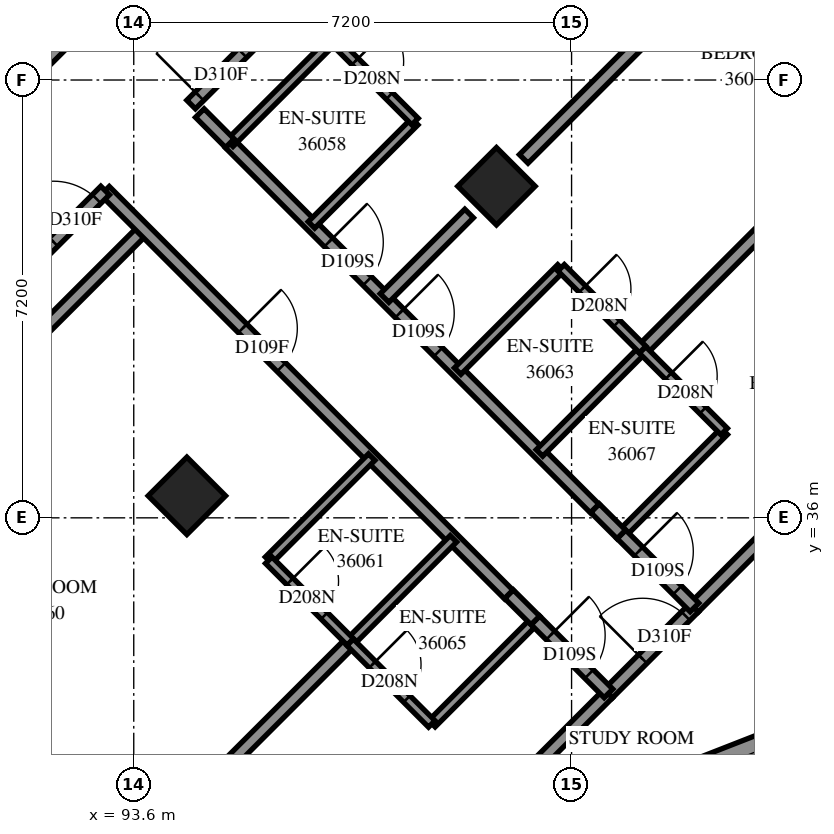
"""IFC4 building model, lengths in metres.
Left out: names, types, materials, properties, quantities, classifications, styles, units other than length and angle.
Written with IfcOpenShell. Run it as: python <this file> out.ifc"""

import sys

from ifc_helpers import new_model, si_unit, direction, frame, frame_2d, origin, origin_2d, place, context, subcontext, project, spatial, polyline, rectangle, outline, extrude, element, fill, save


model = new_model("IFC4")
c1 = context("Model", 3, precision=1e-05, world=origin(), true_north=direction((0.0, 1.0)))
c2 = subcontext(c1, "Body", "Model", "MODEL_VIEW")
j1 = project(units=[si_unit("LENGTHUNIT", "METRE"), si_unit("PLANEANGLEUNIT", "RADIAN")], contexts=[c1])
p1 = place(None, origin())
s1 = spatial("IfcSite", under=j1, at=p1, CompositionType="ELEMENT")
p2 = place(p1, origin())
s2 = spatial("IfcBuilding", under=s1, at=p2, CompositionType="ELEMENT")
p3 = place(p2, frame((0.0, 0.0, 135.4)))
s3 = spatial("IfcBuildingStorey", under=s2, at=p3, CompositionType="ELEMENT", Elevation=135.4)
for number, where, z_axis, x_axis in (
    (1, (99.565, 41.453, 0.0), (0.0, 0.0, 1.0), (0.707, -0.707, 0.0)),
    (2, (94.474, 36.362, 0.0), (0.0, 0.0, 1.0), (0.707, -0.707, 0.0)),
):
    element("IfcColumn", number, at=place(p3, frame(where, z_axis=z_axis, x_axis=x_axis)), inside=s3, PredefinedType="COLUMN", context=c2, shape_type="SweptSolid", body=[
        extrude(rectangle(XDim=0.9, YDim=0.9, at=origin_2d()), origin(), (0.0, 0.0, 1.0), 3.1),
    ])
p4 = place(p3, frame((87.049, 38.695, -0.3), z_axis=(0.0, 0.0, 1.0), x_axis=(0.7071067812, 0.7071067812, 0.0)))
e3 = element("IfcWall", 3, at=p4, inside=s3, PredefinedType="SHEAR", context=c2, shape_type="SweptSolid", body=[
    extrude(rectangle(XDim=14.4, YDim=0.6, at=frame_2d((7.2, 0.0))), origin(), (0.0, 0.0, 1.0), 2.7),
])
p5 = place(p4, frame((4.55, 0.0, 0.3)))
e4 = element("IfcOpeningElement", 4, at=p5, cuts=e3, PredefinedType="OPENING", context=c2, shape_type="SweptSolid", body=[
    extrude(rectangle(XDim=1.1, YDim=2.1, at=frame_2d((0.55, 1.05))), frame((0.0, 0.31, 0.0), z_axis=(0.0, -1.0, 0.0), x_axis=(1.0, 0.0, 0.0)), (0.0, 0.0, 1.0), 0.62),
])
p6 = place(p4, frame((11.35, 0.0, 0.3)))
e5 = element("IfcOpeningElement", 5, at=p6, cuts=e3, PredefinedType="OPENING", context=c2, shape_type="SweptSolid", body=[
    extrude(rectangle(XDim=1.1, YDim=2.1, at=frame_2d((0.55, 1.05))), frame((0.0, 0.31, 0.0), z_axis=(0.0, -1.0, 0.0), x_axis=(1.0, 0.0, 0.0)), (0.0, 0.0, 1.0), 0.62),
])
p7 = place(p3, frame((100.892, 31.004, 0.0), z_axis=(0.0, 0.0, 1.0), x_axis=(0.9313377775, 0.364156483, 0.0)))
e6 = element("IfcWall", 6, at=p7, inside=s3, PredefinedType="SOLIDWALL", context=c2, shape_type="SweptSolid", body=[
    extrude(outline(polyline([(0.11, -0.25), (5.595, -0.25), (5.366, 0.25), (-0.11, 0.25), (0.11, -0.25)])), origin(), (0.0, 0.0, 1.0), 3.1),
])
p8 = place(p7, frame((0.583, 0.0, 0.45)))
e7 = element("IfcOpeningElement", 7, at=p8, cuts=e6, PredefinedType="OPENING", context=c2, shape_type="SweptSolid", body=[
    extrude(rectangle(XDim=2.8, YDim=2.5, at=frame_2d((1.4, 1.25))), frame((0.0, 0.26, 0.0), z_axis=(0.0, -1.0, 0.0), x_axis=(1.0, 0.0, 0.0)), (0.0, 0.0, 1.0), 0.52),
])
p9 = place(p3, frame((86.332, 33.313, 0.0), z_axis=(0.0, 0.0, 1.0), x_axis=(0.7071020252, 0.7071115371, 0.0)))
e8 = element("IfcWall", 8, at=p9, inside=s3, PredefinedType="PARTITIONING", context=c2, shape_type="SweptSolid", body=[
    extrude(rectangle(XDim=10.513, YDim=0.2, at=frame_2d((5.257, 0.0))), origin(), (0.0, 0.0, 1.0), 3.1),
])
p10 = place(p3, frame((93.127, 41.379, 0.0), z_axis=(0.0, 0.0, 1.0), x_axis=(0.7071067812, -0.7071067812, 0.0)))
e9 = element("IfcWall", 9, at=p10, inside=s3, PredefinedType="PARTITIONING", context=c2, shape_type="SweptSolid", body=[
    extrude(rectangle(XDim=9.39, YDim=0.2, at=frame_2d((4.695, 0.0))), origin(), (0.0, 0.0, 1.0), 3.1),
])
p11 = place(p10, frame((3.2, 0.0, 0.0)))
e10 = element("IfcOpeningElement", 10, at=p11, cuts=e9, PredefinedType="OPENING", context=c2, shape_type="SweptSolid", body=[
    extrude(rectangle(XDim=0.9, YDim=2.1, at=frame_2d((0.45, 1.05))), frame((0.0, 0.11, 0.0), z_axis=(0.0, -1.0, 0.0), x_axis=(1.0, 0.0, 0.0)), (0.0, 0.0, 1.0), 0.22),
])
p12 = place(p3, frame((94.543, 42.797, 0.0), z_axis=(0.0, 0.0, 1.0), x_axis=(0.7071067812, 0.7071067812, 0.0)))
e11 = element("IfcWall", 11, at=p12, inside=s3, PredefinedType="PARTITIONING", context=c2, shape_type="SweptSolid", body=[
    extrude(rectangle(XDim=8.901, YDim=0.2, at=frame_2d((4.45, 0.0))), origin(), (0.0, 0.0, 1.0), 3.1),
])
p13 = place(p12, frame((0.193, 0.0, 0.0)))
e12 = element("IfcOpeningElement", 12, at=p13, cuts=e11, PredefinedType="OPENING", context=c2, shape_type="SweptSolid", body=[
    extrude(rectangle(XDim=1.0, YDim=2.1, at=frame_2d((0.5, 1.05))), frame((0.0, 0.11, 0.0), z_axis=(0.0, -1.0, 0.0), x_axis=(1.0, 0.0, 0.0)), (0.0, 0.0, 1.0), 0.22),
])
p14 = place(p3, frame((86.837, 35.091, 0.0), z_axis=(0.0, 0.0, 1.0), x_axis=(0.7071067812, 0.7071067812, 0.0)))
e13 = element("IfcWall", 13, at=p14, inside=s3, PredefinedType="PARTITIONING", context=c2, shape_type="SweptSolid", body=[
    extrude(rectangle(XDim=8.898, YDim=0.2, at=frame_2d((4.449, 0.0))), origin(), (0.0, 0.0, 1.0), 3.1),
])
p15 = place(p14, frame((7.7, 0.0, 0.0)))
e14 = element("IfcOpeningElement", 14, at=p15, cuts=e13, PredefinedType="OPENING", context=c2, shape_type="SweptSolid", body=[
    extrude(rectangle(XDim=1.0, YDim=2.1, at=frame_2d((0.5, 1.05))), frame((0.0, 0.11, 0.0), z_axis=(0.0, -1.0, 0.0), x_axis=(1.0, 0.0, 0.0)), (0.0, 0.0, 1.0), 0.22),
])
p16 = place(p3, frame((95.177, 42.157, 0.0), z_axis=(0.0, 0.0, 1.0), x_axis=(0.7071067812, -0.7071067812, 0.0)))
e15 = element("IfcWall", 15, at=p16, inside=s3, PredefinedType="PARTITIONING", context=c2, shape_type="SweptSolid", body=[
    extrude(rectangle(XDim=8.491, YDim=0.2, at=frame_2d((4.245, 0.0))), origin(), (0.0, 0.0, 1.0), 3.1),
])
p17 = place(p16, frame((2.3, 0.0, 0.0)))
e16 = element("IfcOpeningElement", 16, at=p17, cuts=e15, PredefinedType="OPENING", context=c2, shape_type="SweptSolid", body=[
    extrude(rectangle(XDim=0.9, YDim=2.1, at=frame_2d((0.45, 1.05))), frame((0.0, 0.11, 0.0), z_axis=(0.0, -1.0, 0.0), x_axis=(1.0, 0.0, 0.0)), (0.0, 0.0, 1.0), 0.22),
])
p18 = place(p16, frame((3.95, 0.0, 0.0)))
e17 = element("IfcOpeningElement", 17, at=p18, cuts=e15, PredefinedType="OPENING", context=c2, shape_type="SweptSolid", body=[
    extrude(rectangle(XDim=0.9, YDim=2.1, at=frame_2d((0.45, 1.05))), frame((0.0, 0.11, 0.0), z_axis=(0.0, -1.0, 0.0), x_axis=(1.0, 0.0, 0.0)), (0.0, 0.0, 1.0), 0.22),
])
p19 = place(p3, frame((91.398, 28.19, 0.0), z_axis=(0.0, 0.0, 1.0), x_axis=(0.7072294342, 0.7069841069, 0.0)))
e18 = element("IfcWall", 18, at=p19, inside=s3, PredefinedType="PARTITIONING", context=c2, shape_type="SweptSolid", body=[
    extrude(rectangle(XDim=8.152, YDim=0.2, at=frame_2d((4.076, 0.0))), origin(), (0.0, 0.0, 1.0), 3.1),
])
p20 = place(p3, frame((100.013, 41.903, 0.0), z_axis=(0.0, 0.0, 1.0), x_axis=(0.7071067812, 0.7071067812, 0.0)))
e19 = element("IfcWall", 19, at=p20, inside=s3, PredefinedType="PARTITIONING", context=c2, shape_type="SweptSolid", body=[
    extrude(rectangle(XDim=5.928, YDim=0.2, at=frame_2d((2.964, 0.0))), origin(), (0.0, 0.0, 1.0), 3.1),
])
p21 = place(p3, frame((101.968, 38.766, 0.0), z_axis=(0.0, 0.0, 1.0), x_axis=(0.7071067812, 0.7071067812, 0.0)))
e20 = element("IfcWall", 20, at=p21, inside=s3, PredefinedType="PARTITIONING", context=c2, shape_type="SweptSolid", body=[
    extrude(rectangle(XDim=3.3, YDim=0.2, at=frame_2d((1.65, 0.0))), origin(), (0.0, 0.0, 1.0), 3.1),
])
for number, where, z_axis, x_axis in (
    (21, (96.523, 40.817, 0.0), (0.0, 0.0, 1.0), (0.707, 0.707, 0.0)),
    (22, (98.927, 38.413, 0.0), (0.0, 0.0, 1.0), (0.707, 0.707, 0.0)),
    (23, (98.503, 32.615, 0.0), (0.0, 0.0, 1.0), (0.707, 0.707, 0.0)),
    (24, (95.179, 42.161, 0.0), (0.0, 0.0, 1.0), (0.707, 0.707, 0.0)),
):
    element("IfcWall", number, at=place(p3, frame(where, z_axis=z_axis, x_axis=x_axis)), inside=s3, PredefinedType="PARTITIONING", context=c2, shape_type="SweptSolid", body=[
        extrude(rectangle(XDim=2.401, YDim=0.15, at=frame_2d((1.201, 0.0))), origin(), (0.0, 0.0, 1.0), 3.1),
    ])
p22 = place(p3, frame((100.273, 37.067, 0.0), z_axis=(0.0, 0.0, 1.0), x_axis=(0.706689978, 0.7075233388, 0.0)))
e25 = element("IfcWall", 25, at=p22, inside=s3, PredefinedType="PARTITIONING", context=c2, shape_type="SweptSolid", body=[
    extrude(rectangle(XDim=2.4, YDim=0.15, at=frame_2d((1.2, 0.0))), origin(), (0.0, 0.0, 1.0), 3.1),
])
for number, where, z_axis, x_axis in (
    (26, (97.161, 33.959, 0.0), (0.0, 0.0, 1.0), (0.707, 0.707, 0.0)),
    (27, (95.817, 35.303, 0.0), (0.0, 0.0, 1.0), (0.707, 0.707, 0.0)),
    (28, (101.615, 35.727, 0.0), (0.0, 0.0, 1.0), (0.707, 0.707, 0.0)),
):
    element("IfcWall", number, at=place(p3, frame(where, z_axis=z_axis, x_axis=x_axis)), inside=s3, PredefinedType="PARTITIONING", context=c2, shape_type="SweptSolid", body=[
        extrude(rectangle(XDim=2.398, YDim=0.15, at=frame_2d((1.199, 0.0))), origin(), (0.0, 0.0, 1.0), 3.1),
    ])
p23 = place(p3, frame((101.403, 33.111, 0.0), z_axis=(0.0, 0.0, 1.0), x_axis=(0.7071067812, 0.7071067812, 0.0)))
e29 = element("IfcWall", 29, at=p23, inside=s3, PredefinedType="PARTITIONING", context=c2, shape_type="SweptSolid", body=[
    extrude(rectangle(XDim=2.0, YDim=0.2, at=frame_2d((1.0, 0.0))), origin(), (0.0, 0.0, 1.0), 2.6),
])
p24 = place(p23, frame((0.802, 0.0, 0.0)))
e30 = element("IfcOpeningElement", 30, at=p24, cuts=e29, PredefinedType="OPENING", context=c2, shape_type="SweptSolid", body=[
    extrude(rectangle(XDim=1.0, YDim=2.1, at=frame_2d((0.5, 1.05))), frame((0.0, 0.11, 0.0), z_axis=(0.0, -1.0, 0.0), x_axis=(1.0, 0.0, 0.0)), (0.0, 0.0, 1.0), 0.22),
])
p25 = place(p3, frame((100.013, 31.721, 0.0), z_axis=(0.0, 0.0, 1.0), x_axis=(0.7071067812, 0.7071067812, 0.0)))
e31 = element("IfcWall", 31, at=p25, inside=s3, PredefinedType="PARTITIONING", context=c2, shape_type="SweptSolid", body=[
    extrude(rectangle(XDim=1.966, YDim=0.2, at=frame_2d((0.983, 0.0))), origin(), (0.0, 0.0, 1.0), 2.6),
])
p26 = place(p3, frame((97.725, 39.615, 0.0), z_axis=(0.0, 0.0, 1.0), x_axis=(0.7071067812, 0.7071067812, 0.0)))
e32 = element("IfcWall", 32, at=p26, inside=s3, PredefinedType="PARTITIONING", context=c2, shape_type="SweptSolid", body=[
    extrude(rectangle(XDim=1.966, YDim=0.2, at=frame_2d((0.983, 0.0))), origin(), (0.0, 0.0, 1.0), 3.1),
])
p27 = place(p3, frame((102.817, 34.525, 0.0), z_axis=(0.0, 0.0, 1.0), x_axis=(0.7071067812, 0.7071067812, 0.0)))
e33 = element("IfcWall", 33, at=p27, inside=s3, PredefinedType="PARTITIONING", context=c2, shape_type="SweptSolid", body=[
    extrude(rectangle(XDim=1.963, YDim=0.2, at=frame_2d((0.982, 0.0))), origin(), (0.0, 0.0, 1.0), 2.6),
])
p28 = place(p3, frame((96.881, 43.861, 0.0), z_axis=(0.0, 0.0, 1.0), x_axis=(0.7071067812, -0.7071067812, 0.0)))
e34 = element("IfcWall", 34, at=p28, inside=s3, PredefinedType="PARTITIONING", context=c2, shape_type="SweptSolid", body=[
    extrude(rectangle(XDim=1.901, YDim=0.15, at=frame_2d((0.95, 0.0))), origin(), (0.0, 0.0, 1.0), 3.1),
])
p29 = place(p28, frame((0.505, 0.0, 0.0)))
e35 = element("IfcOpeningElement", 35, at=p29, cuts=e34, PredefinedType="OPENING", context=c2, shape_type="SweptSolid", body=[
    extrude(rectangle(XDim=0.8, YDim=2.1, at=frame_2d((0.4, 1.05))), frame((0.0, 0.085, 0.0), z_axis=(0.0, -1.0, 0.0), x_axis=(1.0, 0.0, 0.0)), (0.0, 0.0, 1.0), 0.17),
])
p30 = place(p3, frame((101.965, 38.763, 0.0), z_axis=(0.0, 0.0, 1.0), x_axis=(0.7071067812, -0.7071067812, 0.0)))
e36 = element("IfcWall", 36, at=p30, inside=s3, PredefinedType="PARTITIONING", context=c2, shape_type="SweptSolid", body=[
    extrude(rectangle(XDim=1.901, YDim=0.15, at=frame_2d((0.95, 0.0))), origin(), (0.0, 0.0, 1.0), 3.1),
])
p31 = place(p30, frame((0.608, 0.0, 0.0)))
e37 = element("IfcOpeningElement", 37, at=p31, cuts=e36, PredefinedType="OPENING", context=c2, shape_type="SweptSolid", body=[
    extrude(rectangle(XDim=0.8, YDim=2.1, at=frame_2d((0.4, 1.05))), frame((0.0, 0.085, 0.0), z_axis=(0.0, -1.0, 0.0), x_axis=(1.0, 0.0, 0.0)), (0.0, 0.0, 1.0), 0.17),
])
p32 = place(p3, frame((100.628, 40.112, 0.0), z_axis=(0.0, 0.0, 1.0), x_axis=(0.7065800724, -0.7076330979, 0.0)))
e38 = element("IfcWall", 38, at=p32, inside=s3, PredefinedType="PARTITIONING", context=c2, shape_type="SweptSolid", body=[
    extrude(rectangle(XDim=1.899, YDim=0.15, at=frame_2d((0.95, 0.0))), origin(), (0.0, 0.0, 1.0), 3.1),
])
p33 = place(p32, frame((0.493, 0.0, 0.0)))
e39 = element("IfcOpeningElement", 39, at=p33, cuts=e38, PredefinedType="OPENING", context=c2, shape_type="SweptSolid", body=[
    extrude(rectangle(XDim=0.8, YDim=2.1, at=frame_2d((0.4, 1.05))), frame((0.0, 0.085, 0.0), z_axis=(0.0, -1.0, 0.0), x_axis=(1.0, 0.0, 0.0)), (0.0, 0.0, 1.0), 0.17),
])
p34 = place(p3, frame((95.82, 35.304, 0.0), z_axis=(0.0, 0.0, 1.0), x_axis=(0.7065800724, -0.7076330979, 0.0)))
e40 = element("IfcWall", 40, at=p34, inside=s3, PredefinedType="PARTITIONING", context=c2, shape_type="SweptSolid", body=[
    extrude(rectangle(XDim=1.899, YDim=0.15, at=frame_2d((0.95, 0.0))), origin(), (0.0, 0.0, 1.0), 3.1),
])
p35 = place(p34, frame((0.493, 0.0, 0.0)))
e41 = element("IfcOpeningElement", 41, at=p35, cuts=e40, PredefinedType="OPENING", context=c2, shape_type="SweptSolid", body=[
    extrude(rectangle(XDim=0.8, YDim=2.1, at=frame_2d((0.4, 1.05))), frame((0.0, 0.085, 0.0), z_axis=(0.0, -1.0, 0.0), x_axis=(1.0, 0.0, 0.0)), (0.0, 0.0, 1.0), 0.17),
])
p36 = place(p3, frame((97.159, 33.953, 0.0), z_axis=(0.0, 0.0, 1.0), x_axis=(0.7071067812, -0.7071067812, 0.0)))
e42 = element("IfcWall", 42, at=p36, inside=s3, PredefinedType="PARTITIONING", context=c2, shape_type="SweptSolid", body=[
    extrude(rectangle(XDim=1.898, YDim=0.15, at=frame_2d((0.949, 0.0))), origin(), (0.0, 0.0, 1.0), 3.1),
])
p37 = place(p36, frame((0.517, 0.0, 0.0)))
e43 = element("IfcOpeningElement", 43, at=p37, cuts=e42, PredefinedType="OPENING", context=c2, shape_type="SweptSolid", body=[
    extrude(rectangle(XDim=0.8, YDim=2.1, at=frame_2d((0.4, 1.05))), frame((0.0, 0.085, 0.0), z_axis=(0.0, -1.0, 0.0), x_axis=(1.0, 0.0, 0.0)), (0.0, 0.0, 1.0), 0.17),
])
p38 = place(p3, frame((100.205, 34.315, 0.0), z_axis=(0.0, 0.0, 1.0), x_axis=(0.7071067812, -0.7071067812, 0.0)))
e44 = element("IfcWall", 44, at=p38, inside=s3, PredefinedType="PARTITIONING", context=c2, shape_type="SweptSolid", body=[
    extrude(rectangle(XDim=1.7, YDim=0.2, at=frame_2d((0.85, 0.0))), origin(), (0.0, 0.0, 1.0), 3.1),
])
p39 = place(p38, frame((0.35, 0.0, 0.0)))
e45 = element("IfcOpeningElement", 45, at=p39, cuts=e44, PredefinedType="OPENING", context=c2, shape_type="SweptSolid", body=[
    extrude(rectangle(XDim=0.9, YDim=2.1, at=frame_2d((0.45, 1.05))), frame((0.0, 0.11, 0.0), z_axis=(0.0, -1.0, 0.0), x_axis=(1.0, 0.0, 0.0)), (0.0, 0.0, 1.0), 0.22),
])
p40 = place(p3, frame((101.619, 35.729, 0.0), z_axis=(0.0, 0.0, 1.0), x_axis=(0.7071067812, -0.7071067812, 0.0)))
e46 = element("IfcWall", 46, at=p40, inside=s3, PredefinedType="PARTITIONING", context=c2, shape_type="SweptSolid", body=[
    extrude(rectangle(XDim=1.7, YDim=0.2, at=frame_2d((0.85, 0.0))), origin(), (0.0, 0.0, 1.0), 3.1),
])
p41 = place(p40, frame((0.4, 0.0, 0.0)))
e47 = element("IfcOpeningElement", 47, at=p41, cuts=e46, PredefinedType="OPENING", context=c2, shape_type="SweptSolid", body=[
    extrude(rectangle(XDim=0.9, YDim=2.1, at=frame_2d((0.45, 1.05))), frame((0.0, 0.11, 0.0), z_axis=(0.0, -1.0, 0.0), x_axis=(1.0, 0.0, 0.0)), (0.0, 0.0, 1.0), 0.22),
])
p42 = place(p3, frame((94.686, 42.656, 0.0), z_axis=(0.0, 0.0, 1.0), x_axis=(0.7056768426, -0.7085338339, 0.0)))
e48 = element("IfcWall", 48, at=p42, inside=s3, PredefinedType="PARTITIONING", context=c2, shape_type="SweptSolid", body=[
    extrude(rectangle(XDim=0.7, YDim=0.2, at=frame_2d((0.35, 0.0))), origin(), (0.0, 0.0, 1.0), 3.1),
])
for number, where, z_axis, x_axis in (
    (49, (101.186, 36.158, 0.0), (0.0, 0.0, 1.0), (0.709, -0.705, 0.0)),
    (50, (99.772, 34.744, 0.0), (0.0, 0.0, 1.0), (0.709, -0.705, 0.0)),
):
    element("IfcWall", number, at=place(p3, frame(where, z_axis=z_axis, x_axis=x_axis)), inside=s3, PredefinedType="PARTITIONING", context=c2, shape_type="SweptSolid", body=[
        extrude(rectangle(XDim=0.61, YDim=0.2, at=frame_2d((0.305, 0.0))), origin(), (0.0, 0.0, 1.0), 3.1),
    ])
p43 = place(p8, origin())
e51 = element("IfcWindow", 51, at=p43, inside=s3, PartitioningType="SINGLE_PANEL", PredefinedType="WINDOW", context=c2, shape_type="SweptSolid", body=[
    extrude(rectangle(XDim=2.8, YDim=2.5, at=frame_2d((1.4, 1.25))), frame((0.0, 0.18, 0.0), z_axis=(0.0, -1.0, 0.0), x_axis=(1.0, 0.0, 0.0)), (0.0, 0.0, 1.0), 0.06),
])
fill(e7, e51)
p44 = place(p13, origin())
e52 = element("IfcDoor", 52, at=p44, inside=s3, OperationType="SINGLE_SWING_LEFT", PredefinedType="DOOR", context=c2, shape_type="SweptSolid", body=[
    extrude(rectangle(XDim=1.0, YDim=2.1, at=frame_2d((0.5, 1.05))), frame((0.0, 0.025, 0.0), z_axis=(0.0, -1.0, 0.0), x_axis=(1.0, 0.0, 0.0)), (0.0, 0.0, 1.0), 0.05),
])
fill(e12, e52)
p45 = place(p17, origin())
e53 = element("IfcDoor", 53, at=p45, inside=s3, OperationType="SINGLE_SWING_RIGHT", PredefinedType="DOOR", context=c2, shape_type="SweptSolid", body=[
    extrude(rectangle(XDim=0.9, YDim=2.1, at=frame_2d((0.45, 1.05))), frame((0.0, 0.025, 0.0), z_axis=(0.0, -1.0, 0.0), x_axis=(1.0, 0.0, 0.0)), (0.0, 0.0, 1.0), 0.05),
])
fill(e16, e53)
p46 = place(p29, origin())
e54 = element("IfcDoor", 54, at=p46, inside=s3, OperationType="SINGLE_SWING_RIGHT", PredefinedType="DOOR", context=c2, shape_type="SweptSolid", body=[
    extrude(rectangle(XDim=0.8, YDim=2.1, at=frame_2d((0.4, 1.05))), frame((0.0, 0.025, 0.0), z_axis=(0.0, -1.0, 0.0), x_axis=(1.0, 0.0, 0.0)), (0.0, 0.0, 1.0), 0.05),
])
fill(e35, e54)
p47 = place(p15, origin())
e55 = element("IfcDoor", 55, at=p47, inside=s3, OperationType="SINGLE_SWING_LEFT", PredefinedType="DOOR", context=c2, shape_type="SweptSolid", body=[
    extrude(rectangle(XDim=1.0, YDim=2.1, at=frame_2d((0.5, 1.05))), frame((0.0, 0.025, 0.0), z_axis=(0.0, -1.0, 0.0), x_axis=(1.0, 0.0, 0.0)), (0.0, 0.0, 1.0), 0.05),
])
fill(e14, e55)
p48 = place(p11, origin())
e56 = element("IfcDoor", 56, at=p48, inside=s3, OperationType="SINGLE_SWING_LEFT", PredefinedType="DOOR", context=c2, shape_type="SweptSolid", body=[
    extrude(rectangle(XDim=0.9, YDim=2.1, at=frame_2d((0.45, 1.05))), frame((0.0, 0.025, 0.0), z_axis=(0.0, -1.0, 0.0), x_axis=(1.0, 0.0, 0.0)), (0.0, 0.0, 1.0), 0.05),
])
fill(e10, e56)
p49 = place(p35, origin())
e57 = element("IfcDoor", 57, at=p49, inside=s3, OperationType="SINGLE_SWING_RIGHT", PredefinedType="DOOR", context=c2, shape_type="SweptSolid", body=[
    extrude(rectangle(XDim=0.8, YDim=2.1, at=frame_2d((0.4, 1.05))), frame((0.0, 0.025, 0.0), z_axis=(0.0, -1.0, 0.0), x_axis=(1.0, 0.0, 0.0)), (0.0, 0.0, 1.0), 0.05),
])
fill(e41, e57)
p50 = place(p18, origin())
e58 = element("IfcDoor", 58, at=p50, inside=s3, OperationType="SINGLE_SWING_LEFT", PredefinedType="DOOR", context=c2, shape_type="SweptSolid", body=[
    extrude(rectangle(XDim=0.9, YDim=2.1, at=frame_2d((0.45, 1.05))), frame((0.0, 0.025, 0.0), z_axis=(0.0, -1.0, 0.0), x_axis=(1.0, 0.0, 0.0)), (0.0, 0.0, 1.0), 0.05),
])
fill(e17, e58)
p51 = place(p33, origin())
e59 = element("IfcDoor", 59, at=p51, inside=s3, OperationType="SINGLE_SWING_RIGHT", PredefinedType="DOOR", context=c2, shape_type="SweptSolid", body=[
    extrude(rectangle(XDim=0.8, YDim=2.1, at=frame_2d((0.4, 1.05))), frame((0.0, 0.025, 0.0), z_axis=(0.0, -1.0, 0.0), x_axis=(1.0, 0.0, 0.0)), (0.0, 0.0, 1.0), 0.05),
])
fill(e39, e59)
p52 = place(p39, origin())
e60 = element("IfcDoor", 60, at=p52, inside=s3, OperationType="SINGLE_SWING_LEFT", PredefinedType="DOOR", context=c2, shape_type="SweptSolid", body=[
    extrude(rectangle(XDim=0.9, YDim=2.1, at=frame_2d((0.45, 1.05))), frame((0.0, 0.025, 0.0), z_axis=(0.0, -1.0, 0.0), x_axis=(1.0, 0.0, 0.0)), (0.0, 0.0, 1.0), 0.05),
])
fill(e45, e60)
p53 = place(p37, origin())
e61 = element("IfcDoor", 61, at=p53, inside=s3, OperationType="SINGLE_SWING_RIGHT", PredefinedType="DOOR", context=c2, shape_type="SweptSolid", body=[
    extrude(rectangle(XDim=0.8, YDim=2.1, at=frame_2d((0.4, 1.05))), frame((0.0, 0.025, 0.0), z_axis=(0.0, -1.0, 0.0), x_axis=(1.0, 0.0, 0.0)), (0.0, 0.0, 1.0), 0.05),
])
fill(e43, e61)
p54 = place(p41, origin())
e62 = element("IfcDoor", 62, at=p54, inside=s3, OperationType="SINGLE_SWING_RIGHT", PredefinedType="DOOR", context=c2, shape_type="SweptSolid", body=[
    extrude(rectangle(XDim=0.9, YDim=2.1, at=frame_2d((0.45, 1.05))), frame((0.0, 0.025, 0.0), z_axis=(0.0, -1.0, 0.0), x_axis=(1.0, 0.0, 0.0)), (0.0, 0.0, 1.0), 0.05),
])
fill(e47, e62)
p55 = place(p31, origin())
e63 = element("IfcDoor", 63, at=p55, inside=s3, OperationType="SINGLE_SWING_RIGHT", PredefinedType="DOOR", context=c2, shape_type="SweptSolid", body=[
    extrude(rectangle(XDim=0.8, YDim=2.1, at=frame_2d((0.4, 1.05))), frame((0.0, 0.025, 0.0), z_axis=(0.0, -1.0, 0.0), x_axis=(1.0, 0.0, 0.0)), (0.0, 0.0, 1.0), 0.05),
])
fill(e37, e63)
p56 = place(p24, origin())
e64 = element("IfcDoor", 64, at=p56, inside=s3, OperationType="SINGLE_SWING_RIGHT", PredefinedType="DOOR", context=c2, shape_type="SweptSolid", body=[
    extrude(rectangle(XDim=1.0, YDim=2.1, at=frame_2d((0.5, 1.05))), frame((0.0, 0.025, 0.0), z_axis=(0.0, -1.0, 0.0), x_axis=(1.0, 0.0, 0.0)), (0.0, 0.0, 1.0), 0.05),
])
fill(e30, e64)
save(model, sys.argv[1])
